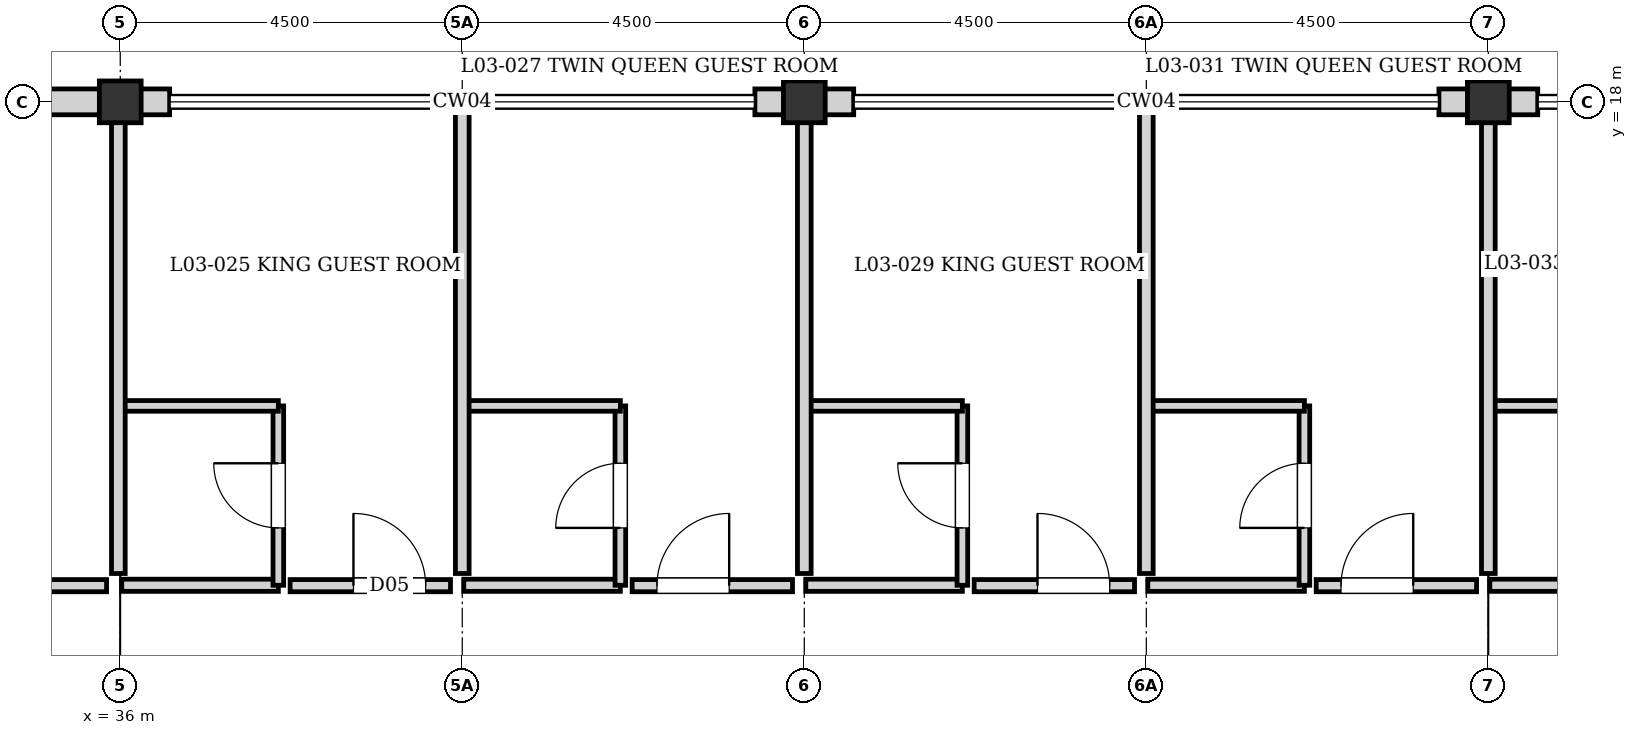
"""IFC4 building model, lengths in metres.
Left out: names, types, materials, properties, quantities, classifications, styles, units other than length and angle.
Written with IfcOpenShell. Run it as: python <this file> out.ifc"""

import sys

from ifc_helpers import new_model, si_unit, direction, frame, frame_2d, origin, origin_2d, place, context, subcontext, project, spatial, rectangle, extrude, element, fill, save


model = new_model("IFC4")
c1 = context("Model", 3, precision=1e-05, world=origin(), true_north=direction((0.0, 1.0)))
c2 = subcontext(c1, "Body", "Model", "MODEL_VIEW")
j1 = project(units=[si_unit("LENGTHUNIT", "METRE"), si_unit("PLANEANGLEUNIT", "RADIAN")], contexts=[c1])
p1 = place(None, origin())
s1 = spatial("IfcSite", under=j1, at=p1, CompositionType="ELEMENT")
p2 = place(p1, origin())
s2 = spatial("IfcBuilding", under=s1, at=p2, CompositionType="ELEMENT")
p3 = place(p2, frame((0.0, 0.0, 11.52)))
s3 = spatial("IfcBuildingStorey", under=s2, at=p3, CompositionType="ELEMENT", Elevation=11.52)
for number, where, z_axis, x_axis in (
    (1, (36.0, 18.0, 0.0), (0.0, 0.0, 1.0), (1.0, 0.0, 0.0)),
    (2, (45.0, 18.0, 0.0), (0.0, 0.0, 1.0), (1.0, 0.0, 0.0)),
    (3, (54.0, 18.0, 0.0), (0.0, 0.0, 1.0), (1.0, 0.0, 0.0)),
):
    element("IfcColumn", number, at=place(p3, frame(where, z_axis=z_axis, x_axis=x_axis)), inside=s3, PredefinedType="COLUMN", context=c2, shape_type="SweptSolid", body=[
        extrude(rectangle(XDim=0.55, YDim=0.55, at=origin_2d()), origin(), (0.0, 0.0, 1.0), 3.04),
    ])
p4 = place(p3, frame((27.0, 18.0, 0.0), z_axis=(0.0, 0.0, 1.0), x_axis=(1.0, 0.0, 0.0)))
e4 = element("IfcWall", 4, at=p4, inside=s3, PredefinedType="SOLIDWALL", context=c2, shape_type="SweptSolid", body=[
    extrude(rectangle(XDim=9.0, YDim=0.34, at=frame_2d((4.5, 0.0))), origin(), (0.0, 0.0, 1.0), 2.55),
])
p5 = place(p4, frame((1.75, 0.0, 0.35)))
e5 = element("IfcOpeningElement", 5, at=p5, cuts=e4, PredefinedType="OPENING", context=c2, shape_type="SweptSolid", body=[
    extrude(rectangle(XDim=1.0, YDim=1.6, at=frame_2d((0.5, 0.8))), frame((0.0, 0.18, 0.0), z_axis=(0.0, -1.0, 0.0), x_axis=(1.0, 0.0, 0.0)), (0.0, 0.0, 1.0), 0.36),
])
p6 = place(p4, frame((6.25, 0.0, 0.35)))
e6 = element("IfcOpeningElement", 6, at=p6, cuts=e4, PredefinedType="OPENING", context=c2, shape_type="SweptSolid", body=[
    extrude(rectangle(XDim=1.0, YDim=1.6, at=frame_2d((0.5, 0.8))), frame((0.0, 0.18, 0.0), z_axis=(0.0, -1.0, 0.0), x_axis=(1.0, 0.0, 0.0)), (0.0, 0.0, 1.0), 0.36),
])
for number, where, z_axis, x_axis in (
    (7, (36.0, 18.0, 0.0), (0.0, 0.0, 1.0), (1.0, 0.0, 0.0)),
    (8, (44.35, 18.0, 0.0), (0.0, 0.0, 1.0), (1.0, 0.0, 0.0)),
):
    element("IfcWall", number, at=place(p3, frame(where, z_axis=z_axis, x_axis=x_axis)), inside=s3, PredefinedType="SOLIDWALL", context=c2, shape_type="SweptSolid", body=[
        extrude(rectangle(XDim=0.65, YDim=0.34, at=frame_2d((0.325, 0.0))), origin(), (0.0, 0.0, 1.0), 2.48),
    ])
for number, where, z_axis, x_axis in (
    (9, (45.0, 18.0, 0.0), (0.0, 0.0, 1.0), (1.0, 0.0, 0.0)),
    (10, (53.35, 18.0, 0.0), (0.0, 0.0, 1.0), (1.0, 0.0, 0.0)),
):
    element("IfcWall", number, at=place(p3, frame(where, z_axis=z_axis, x_axis=x_axis)), inside=s3, PredefinedType="SOLIDWALL", context=c2, shape_type="SweptSolid", body=[
        extrude(rectangle(XDim=0.65, YDim=0.34, at=frame_2d((0.325, 0.0))), origin(), (0.0, 0.0, 1.0), 2.42),
    ])
p7 = place(p3, frame((54.0, 18.0, 0.0), z_axis=(0.0, 0.0, 1.0), x_axis=(1.0, 0.0, 0.0)))
e11 = element("IfcWall", 11, at=p7, inside=s3, PredefinedType="SOLIDWALL", context=c2, shape_type="SweptSolid", body=[
    extrude(rectangle(XDim=0.65, YDim=0.34, at=frame_2d((0.325, 0.0))), origin(), (0.0, 0.0, 1.0), 2.38),
])
p8 = place(p3, frame((36.02, 11.64, 0.0), z_axis=(0.0, 0.0, 1.0), x_axis=(1.0, 0.0, 0.0)))
e12 = element("IfcWall", 12, at=p8, inside=s3, PredefinedType="PARTITIONING", context=c2, shape_type="SweptSolid", body=[
    extrude(rectangle(XDim=2.06, YDim=0.16, at=frame_2d((1.03, 0.0))), origin(), (0.0, 0.0, 1.0), 2.82),
])
p9 = place(p3, frame((38.08, 11.64, 0.0), z_axis=(0.0, 0.0, 1.0), x_axis=(0.0, 1.0, 0.0)))
e13 = element("IfcWall", 13, at=p9, inside=s3, PredefinedType="PLUMBINGWALL", context=c2, shape_type="SweptSolid", body=[
    extrude(rectangle(XDim=2.36, YDim=0.14, at=frame_2d((1.18, 0.0))), origin(), (0.0, 0.0, 1.0), 2.82),
])
p10 = place(p9, frame((0.755, 0.0, 0.0)))
e14 = element("IfcOpeningElement", 14, at=p10, cuts=e13, PredefinedType="OPENING", context=c2, shape_type="SweptSolid", body=[
    extrude(rectangle(XDim=0.85, YDim=2.04, at=frame_2d((0.425, 1.02))), frame((0.0, 0.08, 0.0), z_axis=(0.0, -1.0, 0.0), x_axis=(1.0, 0.0, 0.0)), (0.0, 0.0, 1.0), 0.16),
])
p11 = place(p3, frame((36.02, 14.0, 0.0), z_axis=(0.0, 0.0, 1.0), x_axis=(1.0, 0.0, 0.0)))
e15 = element("IfcWall", 15, at=p11, inside=s3, PredefinedType="PLUMBINGWALL", context=c2, shape_type="SweptSolid", body=[
    extrude(rectangle(XDim=2.06, YDim=0.14, at=frame_2d((1.03, 0.0))), origin(), (0.0, 0.0, 1.0), 2.82),
])
p12 = place(p3, frame((40.52, 11.64, 0.0), z_axis=(0.0, 0.0, 1.0), x_axis=(1.0, 0.0, 0.0)))
e16 = element("IfcWall", 16, at=p12, inside=s3, PredefinedType="PARTITIONING", context=c2, shape_type="SweptSolid", body=[
    extrude(rectangle(XDim=2.06, YDim=0.16, at=frame_2d((1.03, 0.0))), origin(), (0.0, 0.0, 1.0), 2.82),
])
p13 = place(p3, frame((42.58, 11.64, 0.0), z_axis=(0.0, 0.0, 1.0), x_axis=(0.0, 1.0, 0.0)))
e17 = element("IfcWall", 17, at=p13, inside=s3, PredefinedType="PLUMBINGWALL", context=c2, shape_type="SweptSolid", body=[
    extrude(rectangle(XDim=2.36, YDim=0.14, at=frame_2d((1.18, 0.0))), origin(), (0.0, 0.0, 1.0), 2.82),
])
p14 = place(p13, frame((0.755, 0.0, 0.0)))
e18 = element("IfcOpeningElement", 18, at=p14, cuts=e17, PredefinedType="OPENING", context=c2, shape_type="SweptSolid", body=[
    extrude(rectangle(XDim=0.85, YDim=2.04, at=frame_2d((0.425, 1.02))), frame((0.0, 0.08, 0.0), z_axis=(0.0, -1.0, 0.0), x_axis=(1.0, 0.0, 0.0)), (0.0, 0.0, 1.0), 0.16),
])
p15 = place(p3, frame((40.52, 14.0, 0.0), z_axis=(0.0, 0.0, 1.0), x_axis=(1.0, 0.0, 0.0)))
e19 = element("IfcWall", 19, at=p15, inside=s3, PredefinedType="PLUMBINGWALL", context=c2, shape_type="SweptSolid", body=[
    extrude(rectangle(XDim=2.06, YDim=0.14, at=frame_2d((1.03, 0.0))), origin(), (0.0, 0.0, 1.0), 2.82),
])
p16 = place(p3, frame((45.02, 11.64, 0.0), z_axis=(0.0, 0.0, 1.0), x_axis=(1.0, 0.0, 0.0)))
e20 = element("IfcWall", 20, at=p16, inside=s3, PredefinedType="PARTITIONING", context=c2, shape_type="SweptSolid", body=[
    extrude(rectangle(XDim=2.06, YDim=0.16, at=frame_2d((1.03, 0.0))), origin(), (0.0, 0.0, 1.0), 2.82),
])
p17 = place(p3, frame((47.08, 11.64, 0.0), z_axis=(0.0, 0.0, 1.0), x_axis=(0.0, 1.0, 0.0)))
e21 = element("IfcWall", 21, at=p17, inside=s3, PredefinedType="PLUMBINGWALL", context=c2, shape_type="SweptSolid", body=[
    extrude(rectangle(XDim=2.36, YDim=0.14, at=frame_2d((1.18, 0.0))), origin(), (0.0, 0.0, 1.0), 2.82),
])
p18 = place(p17, frame((0.755, 0.0, 0.0)))
e22 = element("IfcOpeningElement", 22, at=p18, cuts=e21, PredefinedType="OPENING", context=c2, shape_type="SweptSolid", body=[
    extrude(rectangle(XDim=0.85, YDim=2.04, at=frame_2d((0.425, 1.02))), frame((0.0, 0.08, 0.0), z_axis=(0.0, -1.0, 0.0), x_axis=(1.0, 0.0, 0.0)), (0.0, 0.0, 1.0), 0.16),
])
p19 = place(p3, frame((45.02, 14.0, 0.0), z_axis=(0.0, 0.0, 1.0), x_axis=(1.0, 0.0, 0.0)))
e23 = element("IfcWall", 23, at=p19, inside=s3, PredefinedType="PLUMBINGWALL", context=c2, shape_type="SweptSolid", body=[
    extrude(rectangle(XDim=2.06, YDim=0.14, at=frame_2d((1.03, 0.0))), origin(), (0.0, 0.0, 1.0), 2.82),
])
p20 = place(p3, frame((49.52, 11.64, 0.0), z_axis=(0.0, 0.0, 1.0), x_axis=(1.0, 0.0, 0.0)))
e24 = element("IfcWall", 24, at=p20, inside=s3, PredefinedType="PARTITIONING", context=c2, shape_type="SweptSolid", body=[
    extrude(rectangle(XDim=2.06, YDim=0.16, at=frame_2d((1.03, 0.0))), origin(), (0.0, 0.0, 1.0), 2.82),
])
p21 = place(p3, frame((51.58, 11.64, 0.0), z_axis=(0.0, 0.0, 1.0), x_axis=(0.0, 1.0, 0.0)))
e25 = element("IfcWall", 25, at=p21, inside=s3, PredefinedType="PLUMBINGWALL", context=c2, shape_type="SweptSolid", body=[
    extrude(rectangle(XDim=2.36, YDim=0.14, at=frame_2d((1.18, 0.0))), origin(), (0.0, 0.0, 1.0), 2.82),
])
p22 = place(p21, frame((0.755, 0.0, 0.0)))
e26 = element("IfcOpeningElement", 26, at=p22, cuts=e25, PredefinedType="OPENING", context=c2, shape_type="SweptSolid", body=[
    extrude(rectangle(XDim=0.85, YDim=2.04, at=frame_2d((0.425, 1.02))), frame((0.0, 0.08, 0.0), z_axis=(0.0, -1.0, 0.0), x_axis=(1.0, 0.0, 0.0)), (0.0, 0.0, 1.0), 0.16),
])
p23 = place(p3, frame((49.52, 14.0, 0.0), z_axis=(0.0, 0.0, 1.0), x_axis=(1.0, 0.0, 0.0)))
e27 = element("IfcWall", 27, at=p23, inside=s3, PredefinedType="PLUMBINGWALL", context=c2, shape_type="SweptSolid", body=[
    extrude(rectangle(XDim=2.06, YDim=0.14, at=frame_2d((1.03, 0.0))), origin(), (0.0, 0.0, 1.0), 2.82),
])
p24 = place(p3, frame((54.02, 11.64, 0.0), z_axis=(0.0, 0.0, 1.0), x_axis=(1.0, 0.0, 0.0)))
e28 = element("IfcWall", 28, at=p24, inside=s3, PredefinedType="PARTITIONING", context=c2, shape_type="SweptSolid", body=[
    extrude(rectangle(XDim=2.06, YDim=0.16, at=frame_2d((1.03, 0.0))), origin(), (0.0, 0.0, 1.0), 2.82),
])
p25 = place(p3, frame((54.02, 14.0, 0.0), z_axis=(0.0, 0.0, 1.0), x_axis=(1.0, 0.0, 0.0)))
e29 = element("IfcWall", 29, at=p25, inside=s3, PredefinedType="PLUMBINGWALL", context=c2, shape_type="SweptSolid", body=[
    extrude(rectangle(XDim=2.06, YDim=0.14, at=frame_2d((1.03, 0.0))), origin(), (0.0, 0.0, 1.0), 2.82),
])
p26 = place(p3, frame((35.975, 11.795, 0.0), z_axis=(0.0, 0.0, 1.0), x_axis=(0.0, 1.0, 0.0)))
e30 = element("IfcWall", 30, at=p26, inside=s3, PredefinedType="PARTITIONING", context=c2, shape_type="SweptSolid", body=[
    extrude(rectangle(XDim=6.03, YDim=0.18, at=frame_2d((3.015, 0.0))), origin(), (0.0, 0.0, 1.0), 2.34),
])
p27 = place(p3, frame((40.5, 11.795, 0.0), z_axis=(0.0, 0.0, 1.0), x_axis=(0.0, 1.0, 0.0)))
e31 = element("IfcWall", 31, at=p27, inside=s3, PredefinedType="PARTITIONING", context=c2, shape_type="SweptSolid", body=[
    extrude(rectangle(XDim=6.11, YDim=0.18, at=frame_2d((3.055, 0.0))), origin(), (0.0, 0.0, 1.0), 2.82),
])
p28 = place(p3, frame((45.0, 11.795, 0.0), z_axis=(0.0, 0.0, 1.0), x_axis=(0.0, 1.0, 0.0)))
e32 = element("IfcWall", 32, at=p28, inside=s3, PredefinedType="PARTITIONING", context=c2, shape_type="SweptSolid", body=[
    extrude(rectangle(XDim=6.03, YDim=0.18, at=frame_2d((3.015, 0.0))), origin(), (0.0, 0.0, 1.0), 2.29),
])
p29 = place(p3, frame((49.5, 11.795, 0.0), z_axis=(0.0, 0.0, 1.0), x_axis=(0.0, 1.0, 0.0)))
e33 = element("IfcWall", 33, at=p29, inside=s3, PredefinedType="PARTITIONING", context=c2, shape_type="SweptSolid", body=[
    extrude(rectangle(XDim=6.11, YDim=0.18, at=frame_2d((3.055, 0.0))), origin(), (0.0, 0.0, 1.0), 2.82),
])
p30 = place(p3, frame((54.0, 11.795, 0.0), z_axis=(0.0, 0.0, 1.0), x_axis=(0.0, 1.0, 0.0)))
e34 = element("IfcWall", 34, at=p30, inside=s3, PredefinedType="PARTITIONING", context=c2, shape_type="SweptSolid", body=[
    extrude(rectangle(XDim=6.03, YDim=0.18, at=frame_2d((3.015, 0.0))), origin(), (0.0, 0.0, 1.0), 2.38),
])
p31 = place(p3, frame((18.005, 11.635, 0.0), z_axis=(0.0, 0.0, 1.0), x_axis=(1.0, 0.0, 0.0)))
e35 = element("IfcWall", 35, at=p31, inside=s3, PredefinedType="PARTITIONING", context=c2, shape_type="SweptSolid", body=[
    extrude(rectangle(XDim=17.815, YDim=0.16, at=frame_2d((8.908, 0.0))), origin(), (0.0, 0.0, 1.0), 2.82),
])
p32 = place(p31, frame((14.915, 0.0, 0.0)))
e36 = element("IfcOpeningElement", 36, at=p32, cuts=e35, PredefinedType="OPENING", context=c2, shape_type="SweptSolid", body=[
    extrude(rectangle(XDim=1.0, YDim=2.1, at=frame_2d((0.5, 1.05))), frame((0.0, 0.09, 0.0), z_axis=(0.0, -1.0, 0.0), x_axis=(1.0, 0.0, 0.0)), (0.0, 0.0, 1.0), 0.18),
])
p33 = place(p3, frame((38.235, 11.635, 0.0), z_axis=(0.0, 0.0, 1.0), x_axis=(1.0, 0.0, 0.0)))
e37 = element("IfcWall", 37, at=p33, inside=s3, PredefinedType="PARTITIONING", context=c2, shape_type="SweptSolid", body=[
    extrude(rectangle(XDim=2.11, YDim=0.16, at=frame_2d((1.055, 0.0))), origin(), (0.0, 0.0, 1.0), 2.82),
])
p34 = place(p33, frame((0.833, 0.0, 0.0)))
e38 = element("IfcOpeningElement", 38, at=p34, cuts=e37, PredefinedType="OPENING", context=c2, shape_type="SweptSolid", body=[
    extrude(rectangle(XDim=0.95, YDim=2.15, at=frame_2d((0.475, 1.075))), frame((0.0, 0.09, 0.0), z_axis=(0.0, -1.0, 0.0), x_axis=(1.0, 0.0, 0.0)), (0.0, 0.0, 1.0), 0.18),
])
p35 = place(p3, frame((42.735, 11.635, 0.0), z_axis=(0.0, 0.0, 1.0), x_axis=(1.0, 0.0, 0.0)))
e39 = element("IfcWall", 39, at=p35, inside=s3, PredefinedType="PARTITIONING", context=c2, shape_type="SweptSolid", body=[
    extrude(rectangle(XDim=2.11, YDim=0.16, at=frame_2d((1.055, 0.0))), origin(), (0.0, 0.0, 1.0), 2.82),
])
p36 = place(p35, frame((0.327, 0.0, 0.0)))
e40 = element("IfcOpeningElement", 40, at=p36, cuts=e39, PredefinedType="OPENING", context=c2, shape_type="SweptSolid", body=[
    extrude(rectangle(XDim=0.95, YDim=2.15, at=frame_2d((0.475, 1.075))), frame((0.0, 0.09, 0.0), z_axis=(0.0, -1.0, 0.0), x_axis=(1.0, 0.0, 0.0)), (0.0, 0.0, 1.0), 0.18),
])
p37 = place(p3, frame((47.235, 11.635, 0.0), z_axis=(0.0, 0.0, 1.0), x_axis=(1.0, 0.0, 0.0)))
e41 = element("IfcWall", 41, at=p37, inside=s3, PredefinedType="PARTITIONING", context=c2, shape_type="SweptSolid", body=[
    extrude(rectangle(XDim=2.11, YDim=0.16, at=frame_2d((1.055, 0.0))), origin(), (0.0, 0.0, 1.0), 2.82),
])
p38 = place(p37, frame((0.833, 0.0, 0.0)))
e42 = element("IfcOpeningElement", 42, at=p38, cuts=e41, PredefinedType="OPENING", context=c2, shape_type="SweptSolid", body=[
    extrude(rectangle(XDim=0.95, YDim=2.15, at=frame_2d((0.475, 1.075))), frame((0.0, 0.09, 0.0), z_axis=(0.0, -1.0, 0.0), x_axis=(1.0, 0.0, 0.0)), (0.0, 0.0, 1.0), 0.18),
])
p39 = place(p3, frame((51.735, 11.635, 0.0), z_axis=(0.0, 0.0, 1.0), x_axis=(1.0, 0.0, 0.0)))
e43 = element("IfcWall", 43, at=p39, inside=s3, PredefinedType="PARTITIONING", context=c2, shape_type="SweptSolid", body=[
    extrude(rectangle(XDim=2.11, YDim=0.16, at=frame_2d((1.055, 0.0))), origin(), (0.0, 0.0, 1.0), 2.82),
])
p40 = place(p39, frame((0.327, 0.0, 0.0)))
e44 = element("IfcOpeningElement", 44, at=p40, cuts=e43, PredefinedType="OPENING", context=c2, shape_type="SweptSolid", body=[
    extrude(rectangle(XDim=0.95, YDim=2.15, at=frame_2d((0.475, 1.075))), frame((0.0, 0.09, 0.0), z_axis=(0.0, -1.0, 0.0), x_axis=(1.0, 0.0, 0.0)), (0.0, 0.0, 1.0), 0.18),
])
p41 = place(p10, origin())
e45 = element("IfcDoor", 45, at=p41, inside=s3, OperationType="SINGLE_SWING_RIGHT", PredefinedType="DOOR", context=c2, shape_type="SweptSolid", body=[
    extrude(rectangle(XDim=0.85, YDim=2.04, at=frame_2d((0.425, 1.02))), frame((0.0, 0.025, 0.0), z_axis=(0.0, -1.0, 0.0), x_axis=(1.0, 0.0, 0.0)), (0.0, 0.0, 1.0), 0.05),
])
fill(e14, e45)
p42 = place(p14, origin())
e46 = element("IfcDoor", 46, at=p42, inside=s3, OperationType="SINGLE_SWING_LEFT", PredefinedType="DOOR", context=c2, shape_type="SweptSolid", body=[
    extrude(rectangle(XDim=0.85, YDim=2.04, at=frame_2d((0.425, 1.02))), frame((0.0, 0.025, 0.0), z_axis=(0.0, -1.0, 0.0), x_axis=(1.0, 0.0, 0.0)), (0.0, 0.0, 1.0), 0.05),
])
fill(e18, e46)
p43 = place(p18, origin())
e47 = element("IfcDoor", 47, at=p43, inside=s3, OperationType="SINGLE_SWING_RIGHT", PredefinedType="DOOR", context=c2, shape_type="SweptSolid", body=[
    extrude(rectangle(XDim=0.85, YDim=2.04, at=frame_2d((0.425, 1.02))), frame((0.0, 0.025, 0.0), z_axis=(0.0, -1.0, 0.0), x_axis=(1.0, 0.0, 0.0)), (0.0, 0.0, 1.0), 0.05),
])
fill(e22, e47)
p44 = place(p22, origin())
e48 = element("IfcDoor", 48, at=p44, inside=s3, OperationType="SINGLE_SWING_LEFT", PredefinedType="DOOR", context=c2, shape_type="SweptSolid", body=[
    extrude(rectangle(XDim=0.85, YDim=2.04, at=frame_2d((0.425, 1.02))), frame((0.0, 0.025, 0.0), z_axis=(0.0, -1.0, 0.0), x_axis=(1.0, 0.0, 0.0)), (0.0, 0.0, 1.0), 0.05),
])
fill(e26, e48)
p45 = place(p34, origin())
e49 = element("IfcDoor", 49, at=p45, inside=s3, OperationType="SINGLE_SWING_LEFT", PredefinedType="DOOR", context=c2, shape_type="SweptSolid", body=[
    extrude(rectangle(XDim=0.95, YDim=2.15, at=frame_2d((0.475, 1.075))), frame((0.0, 0.025, 0.0), z_axis=(0.0, -1.0, 0.0), x_axis=(1.0, 0.0, 0.0)), (0.0, 0.0, 1.0), 0.05),
])
fill(e38, e49)
p46 = place(p36, origin())
e50 = element("IfcDoor", 50, at=p46, inside=s3, OperationType="SINGLE_SWING_RIGHT", PredefinedType="DOOR", context=c2, shape_type="SweptSolid", body=[
    extrude(rectangle(XDim=0.95, YDim=2.15, at=frame_2d((0.475, 1.075))), frame((0.0, 0.025, 0.0), z_axis=(0.0, -1.0, 0.0), x_axis=(1.0, 0.0, 0.0)), (0.0, 0.0, 1.0), 0.05),
])
fill(e40, e50)
p47 = place(p38, origin())
e51 = element("IfcDoor", 51, at=p47, inside=s3, OperationType="SINGLE_SWING_LEFT", PredefinedType="DOOR", context=c2, shape_type="SweptSolid", body=[
    extrude(rectangle(XDim=0.95, YDim=2.15, at=frame_2d((0.475, 1.075))), frame((0.0, 0.025, 0.0), z_axis=(0.0, -1.0, 0.0), x_axis=(1.0, 0.0, 0.0)), (0.0, 0.0, 1.0), 0.05),
])
fill(e42, e51)
p48 = place(p40, origin())
e52 = element("IfcDoor", 52, at=p48, inside=s3, OperationType="SINGLE_SWING_RIGHT", PredefinedType="DOOR", context=c2, shape_type="SweptSolid", body=[
    extrude(rectangle(XDim=0.95, YDim=2.15, at=frame_2d((0.475, 1.075))), frame((0.0, 0.025, 0.0), z_axis=(0.0, -1.0, 0.0), x_axis=(1.0, 0.0, 0.0)), (0.0, 0.0, 1.0), 0.05),
])
fill(e44, e52)
save(model, sys.argv[1])
